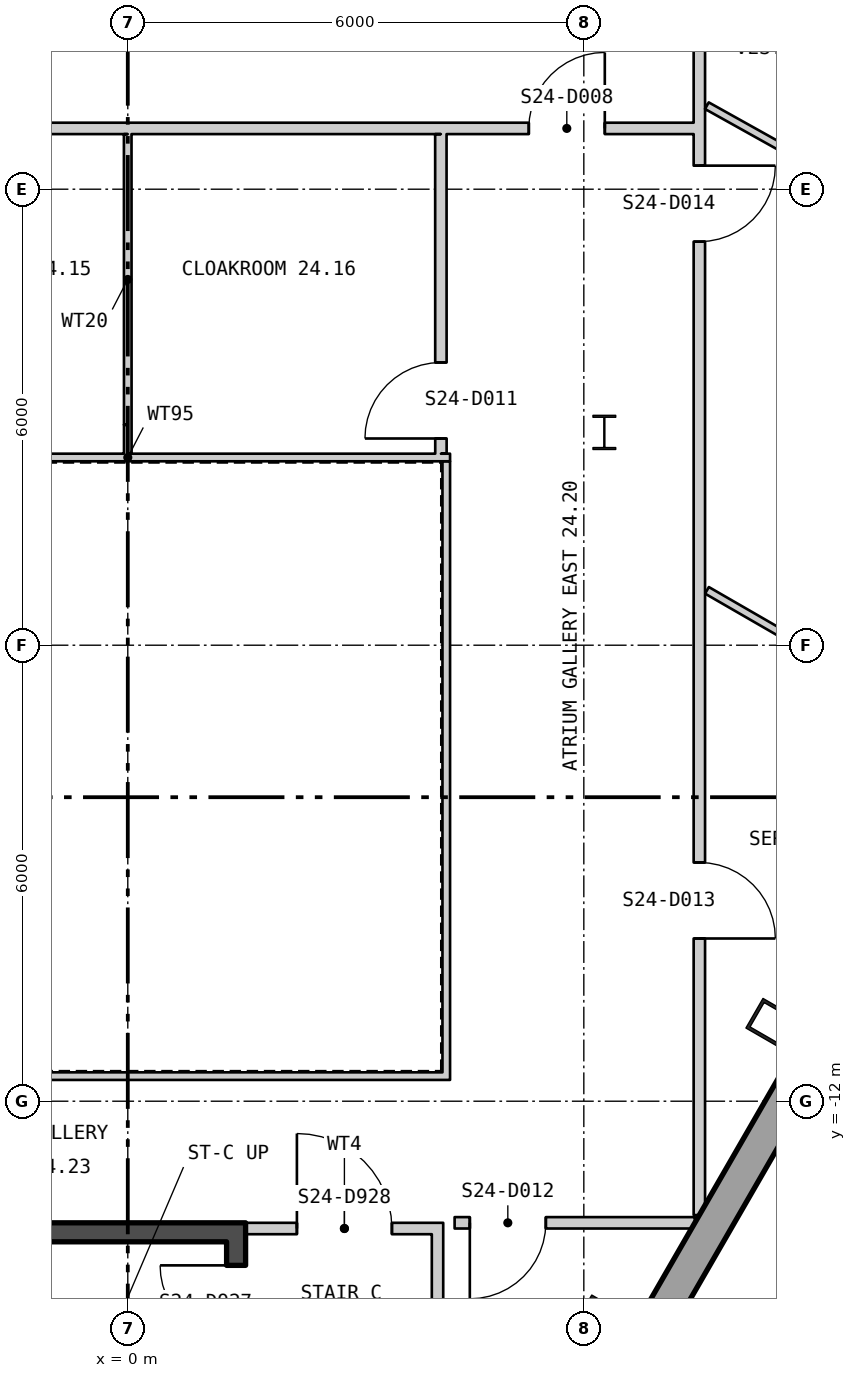
"""IFC4 building model, lengths in metres.
Left out: names, types, materials, properties, quantities, classifications, styles, units other than length and angle.
Written with IfcOpenShell. Run it as: python <this file> out.ifc"""

import sys

from ifc_helpers import new_model, si_unit, direction, frame, frame_2d, origin, origin_2d, place, context, subcontext, project, spatial, polyline, rectangle, hollow_rectangle, i_section, outline, extrude, element, fill, save


model = new_model("IFC4")
c1 = context("Model", 3, precision=1e-05, world=origin(), true_north=direction((0.0, 1.0)))
c2 = subcontext(c1, "Body", "Model", "MODEL_VIEW")
j1 = project(units=[si_unit("LENGTHUNIT", "METRE"), si_unit("PLANEANGLEUNIT", "RADIAN")], contexts=[c1])
p1 = place(None, origin())
s1 = spatial("IfcSite", under=j1, at=p1, CompositionType="ELEMENT")
p2 = place(p1, origin())
s2 = spatial("IfcBuilding", under=s1, at=p2, CompositionType="ELEMENT")
p3 = place(p2, frame((0.0, 0.0, 312.6)))
s3 = spatial("IfcBuildingStorey", under=s2, at=p3, CompositionType="ELEMENT", Elevation=312.6)
for number, where, z_axis, x_axis in (
    (1, (6.295, -14.92, 0.0), (0.0, 0.0, 1.0), (0.5, 0.866, 0.0)),
    (2, (8.548, -11.017, 0.0), (0.0, 0.0, 1.0), (0.5, 0.866, 0.0)),
):
    element("IfcColumn", number, at=place(p3, frame(where, z_axis=z_axis, x_axis=x_axis)), inside=s3, PredefinedType="COLUMN", context=c2, shape_type="SweptSolid", body=[
        extrude(hollow_rectangle(XDim=0.45, YDim=0.7, WallThickness=0.04, at=origin_2d()), origin(), (0.0, 0.0, 1.0), 4.2),
    ])
p4 = place(p3, frame((6.27, -3.2, 0.0), z_axis=(0.0, 0.0, 1.0), x_axis=(1.0, 0.0, 0.0)))
e3 = element("IfcColumn", 3, at=p4, inside=s3, PredefinedType="COLUMN", context=c2, shape_type="SweptSolid", body=[
    extrude(i_section(OverallWidth=0.3, OverallDepth=0.45, WebThickness=0.014, FlangeThickness=0.026, at=origin_2d()), origin(), (0.0, 0.0, 1.0), 4.2),
])
p5 = place(p3, frame((2.12, -23.301, -0.18), z_axis=(0.0, 0.0, 1.0), x_axis=(0.500000141277, 0.866025322218, 0.0)))
e4 = element("IfcWall", 4, at=p5, inside=s3, PredefinedType="SOLIDWALL", context=c2, shape_type="SweptSolid", body=[
    extrude(outline(polyline([(-0.13, -0.225), (45.86, -0.225), (45.6, 0.225), (0.13, 0.225), (-0.13, -0.225)])), origin(), (0.0, 0.0, 1.0), 3.98),
])
p6 = place(p5, frame((1.424, 0.0, 1.08)))
e5 = element("IfcOpeningElement", 5, at=p6, cuts=e4, PredefinedType="OPENING", context=c2, shape_type="SweptSolid", body=[
    extrude(rectangle(XDim=2.4, YDim=2.3, at=frame_2d((1.2, 1.15))), frame((0.0, 0.235, 0.0), z_axis=(0.0, -1.0, 0.0), x_axis=(1.0, 0.0, 0.0)), (0.0, 0.0, 1.0), 0.47),
])
p7 = place(p5, frame((5.892, 0.0, 1.08)))
e6 = element("IfcOpeningElement", 6, at=p7, cuts=e4, PredefinedType="OPENING", context=c2, shape_type="SweptSolid", body=[
    extrude(rectangle(XDim=2.4, YDim=2.3, at=frame_2d((1.2, 1.15))), frame((0.0, 0.235, 0.0), z_axis=(0.0, -1.0, 0.0), x_axis=(1.0, 0.0, 0.0)), (0.0, 0.0, 1.0), 0.47),
])
p8 = place(p5, frame((14.905, 0.0, 1.08)))
e7 = element("IfcOpeningElement", 7, at=p8, cuts=e4, PredefinedType="OPENING", context=c2, shape_type="SweptSolid", body=[
    extrude(rectangle(XDim=2.4, YDim=2.3, at=frame_2d((1.2, 1.15))), frame((0.0, 0.235, 0.0), z_axis=(0.0, -1.0, 0.0), x_axis=(1.0, 0.0, 0.0)), (0.0, 0.0, 1.0), 0.47),
])
p9 = place(p5, frame((19.412, 0.0, 1.08)))
e8 = element("IfcOpeningElement", 8, at=p9, cuts=e4, PredefinedType="OPENING", context=c2, shape_type="SweptSolid", body=[
    extrude(rectangle(XDim=2.4, YDim=2.3, at=frame_2d((1.2, 1.15))), frame((0.0, 0.235, 0.0), z_axis=(0.0, -1.0, 0.0), x_axis=(1.0, 0.0, 0.0)), (0.0, 0.0, 1.0), 0.47),
])
p10 = place(p5, frame((23.918, 0.0, 1.08)))
e9 = element("IfcOpeningElement", 9, at=p10, cuts=e4, PredefinedType="OPENING", context=c2, shape_type="SweptSolid", body=[
    extrude(rectangle(XDim=2.4, YDim=2.3, at=frame_2d((1.2, 1.15))), frame((0.0, 0.235, 0.0), z_axis=(0.0, -1.0, 0.0), x_axis=(1.0, 0.0, 0.0)), (0.0, 0.0, 1.0), 0.47),
])
p11 = place(p5, frame((28.425, 0.0, 1.08)))
e10 = element("IfcOpeningElement", 10, at=p11, cuts=e4, PredefinedType="OPENING", context=c2, shape_type="SweptSolid", body=[
    extrude(rectangle(XDim=2.4, YDim=2.3, at=frame_2d((1.2, 1.15))), frame((0.0, 0.235, 0.0), z_axis=(0.0, -1.0, 0.0), x_axis=(1.0, 0.0, 0.0)), (0.0, 0.0, 1.0), 0.47),
])
p12 = place(p5, frame((37.438, 0.0, 1.08)))
e11 = element("IfcOpeningElement", 11, at=p12, cuts=e4, PredefinedType="OPENING", context=c2, shape_type="SweptSolid", body=[
    extrude(rectangle(XDim=2.4, YDim=2.3, at=frame_2d((1.2, 1.15))), frame((0.0, 0.235, 0.0), z_axis=(0.0, -1.0, 0.0), x_axis=(1.0, 0.0, 0.0)), (0.0, 0.0, 1.0), 0.47),
])
p13 = place(p5, frame((41.907, 0.0, 1.08)))
e12 = element("IfcOpeningElement", 12, at=p13, cuts=e4, PredefinedType="OPENING", context=c2, shape_type="SweptSolid", body=[
    extrude(rectangle(XDim=2.4, YDim=2.3, at=frame_2d((1.2, 1.15))), frame((0.0, 0.235, 0.0), z_axis=(0.0, -1.0, 0.0), x_axis=(1.0, 0.0, 0.0)), (0.0, 0.0, 1.0), 0.47),
])
p14 = place(p3, frame((-4.24, -11.67, 0.0), z_axis=(0.0, 0.0, 1.0), x_axis=(1.0, 0.0, 0.0)))
e13 = element("IfcWall", 13, at=p14, inside=s3, PredefinedType="PARTITIONING", context=c2, shape_type="SweptSolid", body=[
    extrude(rectangle(XDim=8.48, YDim=0.1, at=frame_2d((4.24, 0.0))), origin(), (0.0, 0.0, 1.0), 4.0),
])
p15 = place(p3, frame((4.19, -11.62, 0.0), z_axis=(0.0, 0.0, 1.0), x_axis=(0.0, 1.0, 0.0)))
e14 = element("IfcWall", 14, at=p15, inside=s3, PredefinedType="PARTITIONING", context=c2, shape_type="SweptSolid", body=[
    extrude(rectangle(XDim=8.04, YDim=0.1, at=frame_2d((4.02, 0.0))), origin(), (0.0, 0.0, 1.0), 4.0),
])
p16 = place(p3, frame((4.24, -3.53, 0.0), z_axis=(0.0, 0.0, 1.0), x_axis=(-1.0, 0.0, 0.0)))
e15 = element("IfcWall", 15, at=p16, inside=s3, PredefinedType="PARTITIONING", context=c2, shape_type="SweptSolid", body=[
    extrude(rectangle(XDim=8.48, YDim=0.1, at=frame_2d((4.24, 0.0))), origin(), (0.0, 0.0, 1.0), 4.0),
])
p17 = place(p3, frame((1.425, -21.05, 0.0), z_axis=(0.0, 0.0, 1.0), x_axis=(0.0, 1.0, 0.0)))
e16 = element("IfcWall", 16, at=p17, inside=s3, PredefinedType="SHEAR", context=c2, shape_type="SweptSolid", body=[
    extrude(rectangle(XDim=7.2, YDim=0.25, at=frame_2d((3.6, 0.0))), origin(), (0.0, 0.0, 1.0), 4.0),
])
p18 = place(p17, frame((5.89, 0.0, 0.0)))
e17 = element("IfcOpeningElement", 17, at=p18, cuts=e16, PredefinedType="OPENING", context=c2, shape_type="SweptSolid", body=[
    extrude(rectangle(XDim=1.0, YDim=2.1, at=frame_2d((0.5, 1.05))), frame((0.0, 0.135, 0.0), z_axis=(0.0, -1.0, 0.0), x_axis=(1.0, 0.0, 0.0)), (0.0, 0.0, 1.0), 0.27),
])
p19 = place(p3, frame((-1.55, -13.725, 0.0), z_axis=(0.0, 0.0, 1.0), x_axis=(1.0, 0.0, 0.0)))
e18 = element("IfcWall", 18, at=p19, inside=s3, PredefinedType="SHEAR", context=c2, shape_type="SweptSolid", body=[
    extrude(rectangle(XDim=3.1, YDim=0.25, at=frame_2d((1.55, 0.0))), origin(), (0.0, 0.0, 1.0), 4.0),
])
p20 = place(p3, frame((4.075, -16.15, 0.0), z_axis=(0.0, 0.0, 1.0), x_axis=(0.0, 1.0, 0.0)))
e19 = element("IfcWall", 19, at=p20, inside=s3, PredefinedType="PARTITIONING", context=c2, shape_type="SweptSolid", body=[
    extrude(rectangle(XDim=2.4, YDim=0.15, at=frame_2d((1.2, 0.0))), origin(), (0.0, 0.0, 1.0), 4.0),
])
p21 = place(p3, frame((1.55, -13.675, 0.0), z_axis=(0.0, 0.0, 1.0), x_axis=(1.0, 0.0, 0.0)))
e20 = element("IfcWall", 20, at=p21, inside=s3, PredefinedType="PARTITIONING", context=c2, shape_type="SweptSolid", body=[
    extrude(rectangle(XDim=2.6, YDim=0.15, at=frame_2d((1.3, 0.0))), origin(), (0.0, 0.0, 1.0), 3.21),
])
p22 = place(p21, frame((0.675, 0.0, 0.0)))
e21 = element("IfcOpeningElement", 21, at=p22, cuts=e20, PredefinedType="OPENING", context=c2, shape_type="SweptSolid", body=[
    extrude(rectangle(XDim=1.25, YDim=2.1, at=frame_2d((0.625, 1.05))), frame((0.0, 0.085, 0.0), z_axis=(0.0, -1.0, 0.0), x_axis=(1.0, 0.0, 0.0)), (0.0, 0.0, 1.0), 0.17),
])
p23 = place(p3, frame((-7.52, 0.8, 0.0), z_axis=(0.0, 0.0, 1.0), x_axis=(1.0, 0.0, 0.0)))
e22 = element("IfcWall", 22, at=p23, inside=s3, PredefinedType="PARTITIONING", context=c2, shape_type="SweptSolid", body=[
    extrude(rectangle(XDim=14.965, YDim=0.15, at=frame_2d((7.482, 0.0))), origin(), (0.0, 0.0, 1.0), 4.0),
])
p24 = place(p23, frame((1.206, 0.0, 0.0)))
e23 = element("IfcOpeningElement", 23, at=p24, cuts=e22, PredefinedType="OPENING", context=c2, shape_type="SweptSolid", body=[
    extrude(rectangle(XDim=1.0, YDim=2.1, at=frame_2d((0.5, 1.05))), frame((0.0, 0.085, 0.0), z_axis=(0.0, -1.0, 0.0), x_axis=(1.0, 0.0, 0.0)), (0.0, 0.0, 1.0), 0.17),
])
p25 = place(p23, frame((12.796, 0.0, 0.0)))
e24 = element("IfcOpeningElement", 24, at=p25, cuts=e22, PredefinedType="OPENING", context=c2, shape_type="SweptSolid", body=[
    extrude(rectangle(XDim=1.0, YDim=2.1, at=frame_2d((0.5, 1.05))), frame((0.0, 0.085, 0.0), z_axis=(0.0, -1.0, 0.0), x_axis=(1.0, 0.0, 0.0)), (0.0, 0.0, 1.0), 0.17),
])
p26 = place(p3, frame((-0.001, 0.725, 0.0), z_axis=(0.0, 0.0, 1.0), x_axis=(0.000235294111, -0.999999972318, 0.0)))
e25 = element("IfcWall", 25, at=p26, inside=s3, PredefinedType="PARTITIONING", context=c2, shape_type="SweptSolid", body=[
    extrude(rectangle(XDim=3.825, YDim=0.1, at=frame_2d((1.913, 0.0))), origin(), (0.0, 0.0, 1.0), 3.55),
])
p27 = place(p3, frame((-0.0, -3.1, 0.0), z_axis=(0.0, 0.0, 1.0), x_axis=(0.000263157886, -0.999999965374, 0.0)))
e26 = element("IfcWall", 26, at=p27, inside=s3, PredefinedType="PARTITIONING", context=c2, shape_type="SweptSolid", body=[
    extrude(rectangle(XDim=0.38, YDim=0.1, at=frame_2d((0.19, 0.0))), origin(), (0.0, 0.0, 1.0), 4.0),
])
p28 = place(p3, frame((4.119, 0.725, 0.0), z_axis=(0.0, 0.0, 1.0), x_axis=(0.000237812122, -0.999999971723, 0.0)))
e27 = element("IfcWall", 27, at=p28, inside=s3, PredefinedType="PARTITIONING", context=c2, shape_type="SweptSolid", body=[
    extrude(rectangle(XDim=4.205, YDim=0.15, at=frame_2d((2.103, 0.0))), origin(), (0.0, 0.0, 1.0), 4.0),
])
p29 = place(p28, frame((3.005, 0.0, 0.0)))
e28 = element("IfcOpeningElement", 28, at=p29, cuts=e27, PredefinedType="OPENING", context=c2, shape_type="SweptSolid", body=[
    extrude(rectangle(XDim=1.0, YDim=2.1, at=frame_2d((0.5, 1.05))), frame((0.0, 0.085, 0.0), z_axis=(0.0, -1.0, 0.0), x_axis=(1.0, 0.0, 0.0)), (0.0, 0.0, 1.0), 0.17),
])
p30 = place(p3, frame((4.3, -13.6, 0.0), z_axis=(0.0, 0.0, 1.0), x_axis=(1.0, 0.0, 0.0)))
e29 = element("IfcWall", 29, at=p30, inside=s3, PredefinedType="PARTITIONING", context=c2, shape_type="SweptSolid", body=[
    extrude(rectangle(XDim=2.555, YDim=0.15, at=frame_2d((1.278, 0.0))), origin(), (0.0, 0.0, 1.0), 3.21),
])
p31 = place(p30, frame((0.2, 0.0, 0.0)))
e30 = element("IfcOpeningElement", 30, at=p31, cuts=e29, PredefinedType="OPENING", context=c2, shape_type="SweptSolid", body=[
    extrude(rectangle(XDim=1.0, YDim=2.1, at=frame_2d((0.5, 1.05))), frame((0.0, 0.085, 0.0), z_axis=(0.0, -1.0, 0.0), x_axis=(1.0, 0.0, 0.0)), (0.0, 0.0, 1.0), 0.17),
])
p32 = place(p3, frame((6.855, -13.6, 0.0), z_axis=(0.0, 0.0, 1.0), x_axis=(1.0, 0.0, 0.0)))
e31 = element("IfcWall", 31, at=p32, inside=s3, PredefinedType="PARTITIONING", context=c2, shape_type="SweptSolid", body=[
    extrude(rectangle(XDim=0.606, YDim=0.15, at=frame_2d((0.303, 0.0))), origin(), (0.0, 0.0, 1.0), 4.0),
])
p33 = place(p3, frame((7.52, -13.498, 0.0), z_axis=(0.0, 0.0, 1.0), x_axis=(0.0, 1.0, 0.0)))
e32 = element("IfcWall", 32, at=p33, inside=s3, PredefinedType="PARTITIONING", context=c2, shape_type="SweptSolid", body=[
    extrude(rectangle(XDim=17.498, YDim=0.15, at=frame_2d((8.749, 0.0))), origin(), (0.0, 0.0, 1.0), 4.0),
])
p34 = place(p33, frame((3.639, 0.0, 0.0)))
e33 = element("IfcOpeningElement", 33, at=p34, cuts=e32, PredefinedType="OPENING", context=c2, shape_type="SweptSolid", body=[
    extrude(rectangle(XDim=1.0, YDim=2.1, at=frame_2d((0.5, 1.05))), frame((0.0, 0.085, 0.0), z_axis=(0.0, -1.0, 0.0), x_axis=(1.0, 0.0, 0.0)), (0.0, 0.0, 1.0), 0.17),
])
p35 = place(p33, frame((12.808, 0.0, 0.0)))
e34 = element("IfcOpeningElement", 34, at=p35, cuts=e32, PredefinedType="OPENING", context=c2, shape_type="SweptSolid", body=[
    extrude(rectangle(XDim=1.0, YDim=2.1, at=frame_2d((0.5, 1.05))), frame((0.0, 0.085, 0.0), z_axis=(0.0, -1.0, 0.0), x_axis=(1.0, 0.0, 0.0)), (0.0, 0.0, 1.0), 0.17),
])
p36 = place(p33, frame((16.098, 0.0, 0.0)))
e35 = element("IfcOpeningElement", 35, at=p36, cuts=e32, PredefinedType="OPENING", context=c2, shape_type="SweptSolid", body=[
    extrude(rectangle(XDim=1.0, YDim=2.1, at=frame_2d((0.5, 1.05))), frame((0.0, 0.085, 0.0), z_axis=(0.0, -1.0, 0.0), x_axis=(1.0, 0.0, 0.0)), (0.0, 0.0, 1.0), 0.17),
])
p37 = place(p3, frame((7.619, 1.099, 0.0), z_axis=(0.0, 0.0, 1.0), x_axis=(0.873148302033, -0.487454657026, 0.0)))
e36 = element("IfcWall", 36, at=p37, inside=s3, PredefinedType="PARTITIONING", context=c2, shape_type="SweptSolid", body=[
    extrude(rectangle(XDim=7.213, YDim=0.1, at=frame_2d((3.607, 0.0))), origin(), (0.0, 0.0, 1.0), 4.0),
])
p38 = place(p3, frame((7.62, -5.278, 0.0), z_axis=(0.0, 0.0, 1.0), x_axis=(0.866134332687, -0.499811282126, 0.0)))
e37 = element("IfcWall", 37, at=p38, inside=s3, PredefinedType="PARTITIONING", context=c2, shape_type="SweptSolid", body=[
    extrude(rectangle(XDim=3.573, YDim=0.1, at=frame_2d((1.787, 0.0))), origin(), (0.0, 0.0, 1.0), 4.0),
])
p39 = place(p18, origin())
e38 = element("IfcDoor", 38, at=p39, inside=s3, OperationType="SINGLE_SWING_LEFT", PredefinedType="DOOR", context=c2, shape_type="SweptSolid", body=[
    extrude(rectangle(XDim=1.0, YDim=2.1, at=frame_2d((0.5, 1.05))), frame((0.0, 0.025, 0.0), z_axis=(0.0, -1.0, 0.0), x_axis=(1.0, 0.0, 0.0)), (0.0, 0.0, 1.0), 0.05),
])
fill(e17, e38)
p40 = place(p22, origin())
e39 = element("IfcDoor", 39, at=p40, inside=s3, OperationType="SINGLE_SWING_RIGHT", PredefinedType="DOOR", context=c2, shape_type="SweptSolid", body=[
    extrude(rectangle(XDim=1.25, YDim=2.1, at=frame_2d((0.625, 1.05))), frame((0.0, 0.025, 0.0), z_axis=(0.0, -1.0, 0.0), x_axis=(1.0, 0.0, 0.0)), (0.0, 0.0, 1.0), 0.05),
])
fill(e21, e39)
p41 = place(p25, origin())
e40 = element("IfcDoor", 40, at=p41, inside=s3, OperationType="SINGLE_SWING_LEFT", PredefinedType="DOOR", context=c2, shape_type="SweptSolid", body=[
    extrude(rectangle(XDim=1.0, YDim=2.1, at=frame_2d((0.5, 1.05))), frame((0.0, 0.025, 0.0), z_axis=(0.0, -1.0, 0.0), x_axis=(1.0, 0.0, 0.0)), (0.0, 0.0, 1.0), 0.05),
])
fill(e24, e40)
p42 = place(p29, origin())
e41 = element("IfcDoor", 41, at=p42, inside=s3, OperationType="SINGLE_SWING_RIGHT", PredefinedType="DOOR", context=c2, shape_type="SweptSolid", body=[
    extrude(rectangle(XDim=1.0, YDim=2.1, at=frame_2d((0.5, 1.05))), frame((0.0, 0.025, 0.0), z_axis=(0.0, -1.0, 0.0), x_axis=(1.0, 0.0, 0.0)), (0.0, 0.0, 1.0), 0.05),
])
fill(e28, e41)
p43 = place(p31, origin())
e42 = element("IfcDoor", 42, at=p43, inside=s3, OperationType="SINGLE_SWING_LEFT", PredefinedType="DOOR", context=c2, shape_type="SweptSolid", body=[
    extrude(rectangle(XDim=1.0, YDim=2.1, at=frame_2d((0.5, 1.05))), frame((0.0, 0.025, 0.0), z_axis=(0.0, -1.0, 0.0), x_axis=(1.0, 0.0, 0.0)), (0.0, 0.0, 1.0), 0.05),
])
fill(e30, e42)
p44 = place(p34, origin())
e43 = element("IfcDoor", 43, at=p44, inside=s3, OperationType="SINGLE_SWING_LEFT", PredefinedType="DOOR", context=c2, shape_type="SweptSolid", body=[
    extrude(rectangle(XDim=1.0, YDim=2.1, at=frame_2d((0.5, 1.05))), frame((0.0, 0.025, 0.0), z_axis=(0.0, -1.0, 0.0), x_axis=(1.0, 0.0, 0.0)), (0.0, 0.0, 1.0), 0.05),
])
fill(e33, e43)
p45 = place(p35, origin())
e44 = element("IfcDoor", 44, at=p45, inside=s3, OperationType="SINGLE_SWING_RIGHT", PredefinedType="DOOR", context=c2, shape_type="SweptSolid", body=[
    extrude(rectangle(XDim=1.0, YDim=2.1, at=frame_2d((0.5, 1.05))), frame((0.0, 0.025, 0.0), z_axis=(0.0, -1.0, 0.0), x_axis=(1.0, 0.0, 0.0)), (0.0, 0.0, 1.0), 0.05),
])
fill(e34, e44)
save(model, sys.argv[1])
